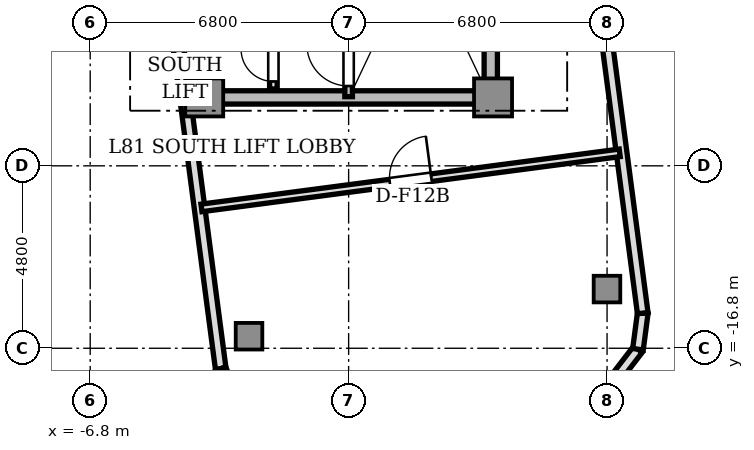
"""IFC4 building model, lengths in metres.
Left out: names, types, materials, properties, quantities, classifications, styles, units other than length and angle.
Written with IfcOpenShell. Run it as: python <this file> out.ifc"""

import sys

from ifc_helpers import new_model, si_unit, direction, frame, frame_2d, origin, origin_2d, place, context, subcontext, project, spatial, rectangle, extrude, source, transform, mapped, element, fill, save


model = new_model("IFC4")
c1 = context("Model", 3, precision=1e-05, world=origin(), true_north=direction((0.0, 1.0)))
c2 = subcontext(c1, "Body", "Model", "MODEL_VIEW")
j1 = project(units=[si_unit("LENGTHUNIT", "METRE"), si_unit("PLANEANGLEUNIT", "RADIAN")], contexts=[c1])
p1 = place(None, origin())
s1 = spatial("IfcSite", under=j1, at=p1, CompositionType="ELEMENT")
p2 = place(p1, origin())
s2 = spatial("IfcBuilding", under=s1, at=p2, CompositionType="ELEMENT")
p3 = place(p2, frame((0.0, 0.0, 292.7)))
s3 = spatial("IfcBuildingStorey", under=s2, at=p3, CompositionType="ELEMENT", Elevation=292.7)
p4 = place(p3, frame((-3.55, -10.2, 0.0), z_axis=(0.0, 0.0, 1.0), x_axis=(1.0, 0.0, 0.0)))
e1 = element("IfcWall", 1, at=p4, inside=s3, PredefinedType="SHEAR", context=c2, shape_type="SweptSolid", body=[
    extrude(rectangle(XDim=7.1, YDim=0.35, at=frame_2d((3.55, 0.0))), origin(), (0.0, 0.0, 1.0), 3.5),
])
p5 = place(p3, frame((3.74, -9.75, 0.0), z_axis=(0.0, 0.0, 1.0), x_axis=(0.0, 1.0, 0.0)))
e2 = element("IfcWall", 2, at=p5, inside=s3, PredefinedType="SHEAR", context=c2, shape_type="SweptSolid", body=[
    extrude(rectangle(XDim=6.9, YDim=0.35, at=frame_2d((3.45, 0.0))), origin(), (0.0, 0.0, 1.0), 3.5),
])
m1 = source(origin(), c2, "Body", "SweptSolid", [
    extrude(rectangle(XDim=1.0, YDim=1.0, at=origin_2d()), origin(), (0.0, 0.0, 1.0), 3.5),
])
for number, where, z_axis, x_axis in (
    (3, (-3.8, -10.2, 0.0), (0.0, 0.0, 1.0), (1.0, 0.0, 0.0)),
    (4, (3.8, -10.2, 0.0), (0.0, 0.0, 1.0), (1.0, 0.0, 0.0)),
):
    element("IfcColumn", number, at=place(p3, frame(where, z_axis=z_axis, x_axis=x_axis)), inside=s3, PredefinedType="COLUMN", context=c2, shape_type="MappedRepresentation", body=[
        mapped(m1, transform((0.0, 0.0, 0.0), scale=1.0)),
    ])
m2 = source(origin(), c2, "Body", "SweptSolid", [
    extrude(rectangle(XDim=0.7, YDim=0.7, at=origin_2d()), origin(), (0.0, 0.0, 1.0), 3.5),
])
for number, where, z_axis, x_axis in (
    (5, (-2.621, -16.483, 0.0), (0.0, 0.0, 1.0), (1.0, 0.0, 0.0)),
    (6, (6.798, -15.243, 0.0), (0.0, 0.0, 1.0), (1.0, 0.0, 0.0)),
):
    element("IfcColumn", number, at=place(p3, frame(where, z_axis=z_axis, x_axis=x_axis)), inside=s3, PredefinedType="COLUMN", context=c2, shape_type="MappedRepresentation", body=[
        mapped(m2, transform((0.0, 0.0, 0.0), scale=1.0)),
    ])
p6 = place(p3, frame((-4.821, -6.283, 0.0), z_axis=(0.0, 0.0, 1.0), x_axis=(0.130521347626, -0.991445499165, 0.0)))
e7 = element("IfcWall", 7, at=p6, inside=s3, PredefinedType="SOLIDWALL", context=c2, shape_type="SweptSolid", body=[
    extrude(rectangle(XDim=11.15, YDim=0.28, at=frame_2d((5.575, 0.0))), origin(), (0.0, 0.0, 1.0), 3.5),
])
p7 = place(p3, frame((-3.366, -17.338, 0.0), z_axis=(0.0, 0.0, 1.0), x_axis=(0.382659506909, -0.923889442397, 0.0)))
e8 = element("IfcWall", 8, at=p7, inside=s3, PredefinedType="SOLIDWALL", context=c2, shape_type="SweptSolid", body=[
    extrude(rectangle(XDim=0.958, YDim=0.28, at=frame_2d((0.479, 0.0))), origin(), (0.0, 0.0, 1.0), 3.5),
])
p8 = place(p3, frame((7.031, -17.585, 0.0), z_axis=(0.0, 0.0, 1.0), x_axis=(0.60861352168, 0.793466811674, 0.0)))
e9 = element("IfcWall", 9, at=p8, inside=s3, PredefinedType="SOLIDWALL", context=c2, shape_type="SweptSolid", body=[
    extrude(rectangle(XDim=0.958, YDim=0.28, at=frame_2d((0.479, 0.0))), origin(), (0.0, 0.0, 1.0), 3.5),
])
p9 = place(p3, frame((7.613, -16.825, 0.0), z_axis=(0.0, 0.0, 1.0), x_axis=(0.130527053476, 0.991444747987, 0.0)))
e10 = element("IfcWall", 10, at=p9, inside=s3, PredefinedType="SOLIDWALL", context=c2, shape_type="SweptSolid", body=[
    extrude(rectangle(XDim=0.958, YDim=0.28, at=frame_2d((0.479, 0.0))), origin(), (0.0, 0.0, 1.0), 3.5),
])
p10 = place(p3, frame((7.738, -15.876, 0.0), z_axis=(0.0, 0.0, 1.0), x_axis=(-0.130521347626, 0.991445499165, 0.0)))
e11 = element("IfcWall", 11, at=p10, inside=s3, PredefinedType="SOLIDWALL", context=c2, shape_type="SweptSolid", body=[
    extrude(rectangle(XDim=11.15, YDim=0.28, at=frame_2d((5.575, 0.0))), origin(), (0.0, 0.0, 1.0), 3.5),
])
p11 = place(p3, frame((0.0, -10.18, 0.0), z_axis=(0.0, 0.0, 1.0), x_axis=(0.0, 1.0, 0.0)))
e12 = element("IfcWall", 12, at=p11, inside=s3, PredefinedType="SOLIDWALL", context=c2, shape_type="SweptSolid", body=[
    extrude(rectangle(XDim=7.68, YDim=0.2, at=frame_2d((3.84, 0.0))), origin(), (0.0, 0.0, 1.0), 3.5),
])
p12 = place(p11, frame((0.28, 0.0, 0.0)))
e13 = element("IfcOpeningElement", 13, at=p12, cuts=e12, PredefinedType="OPENING", context=c2, shape_type="SweptSolid", body=[
    extrude(rectangle(XDim=1.1, YDim=2.15, at=frame_2d((0.55, 1.075))), frame((0.0, 0.11, 0.0), z_axis=(0.0, -1.0, 0.0), x_axis=(1.0, 0.0, 0.0)), (0.0, 0.0, 1.0), 0.22),
])
p13 = place(p3, frame((-1.98, -9.98, 0.0), z_axis=(0.0, 0.0, 1.0), x_axis=(0.0, 1.0, 0.0)))
e14 = element("IfcWall", 14, at=p13, inside=s3, PredefinedType="SOLIDWALL", context=c2, shape_type="SweptSolid", body=[
    extrude(rectangle(XDim=4.66, YDim=0.2, at=frame_2d((2.33, 0.0))), origin(), (0.0, 0.0, 1.0), 3.05),
])
p14 = place(p13, frame((0.2, 0.0, 0.0)))
e15 = element("IfcOpeningElement", 15, at=p14, cuts=e14, PredefinedType="OPENING", context=c2, shape_type="SweptSolid", body=[
    extrude(rectangle(XDim=0.85, YDim=2.1, at=frame_2d((0.425, 1.05))), frame((0.0, 0.11, 0.0), z_axis=(0.0, -1.0, 0.0), x_axis=(1.0, 0.0, 0.0)), (0.0, 0.0, 1.0), 0.22),
])
p15 = place(p3, frame((-3.872, -13.108, 0.0), z_axis=(0.0, 0.0, 1.0), x_axis=(0.991443437127, 0.130537009991, 0.0)))
e16 = element("IfcWall", 16, at=p15, inside=s3, PredefinedType="SOLIDWALL", context=c2, shape_type="SweptSolid", body=[
    extrude(rectangle(XDim=11.1, YDim=0.2, at=frame_2d((5.55, 0.0))), origin(), (0.0, 0.0, 1.0), 3.05),
])
p16 = place(p15, frame((5.0, 0.0, 0.0)))
e17 = element("IfcOpeningElement", 17, at=p16, cuts=e16, PredefinedType="OPENING", context=c2, shape_type="SweptSolid", body=[
    extrude(rectangle(XDim=1.1, YDim=2.15, at=frame_2d((0.55, 1.075))), frame((0.0, 0.11, 0.0), z_axis=(0.0, -1.0, 0.0), x_axis=(1.0, 0.0, 0.0)), (0.0, 0.0, 1.0), 0.22),
])
m3 = source(origin(), c2, "Body", "SweptSolid", [
    extrude(rectangle(XDim=1.1, YDim=0.05, at=origin_2d()), origin(), (0.0, 0.0, 1.0), 2.15),
])
p17 = place(p12, frame((0.55, 0.0, 0.0)))
e18 = element("IfcDoor", 18, at=p17, inside=s3, OperationType="SINGLE_SWING_RIGHT", PredefinedType="DOOR", context=c2, shape_type="MappedRepresentation", body=[
    mapped(m3, transform((0.0, 0.0, 0.0), scale=1.0)),
])
fill(e13, e18)
m4 = source(origin(), c2, "Body", "SweptSolid", [
    extrude(rectangle(XDim=0.85, YDim=0.05, at=origin_2d()), origin(), (0.0, 0.0, 1.0), 2.1),
])
p18 = place(p14, frame((0.425, 0.0, 0.0)))
e19 = element("IfcDoor", 19, at=p18, inside=s3, OperationType="SINGLE_SWING_RIGHT", PredefinedType="DOOR", context=c2, shape_type="MappedRepresentation", body=[
    mapped(m4, transform((0.0, 0.0, 0.0), scale=1.0)),
])
fill(e15, e19)
p19 = place(p16, frame((0.55, 0.0, 0.0)))
e20 = element("IfcDoor", 20, at=p19, inside=s3, OperationType="SINGLE_SWING_RIGHT", PredefinedType="DOOR", context=c2, shape_type="MappedRepresentation", body=[
    mapped(m3, transform((0.0, 0.0, 0.0), scale=1.0)),
])
fill(e17, e20)
save(model, sys.argv[1])
